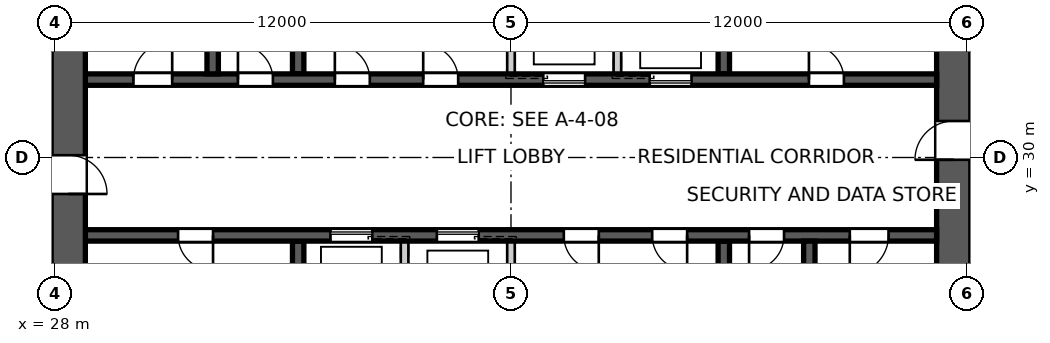
"""IFC4 building model, lengths in metres.
Left out: names, types, materials, properties, quantities, classifications, styles, units other than length and angle.
Written with IfcOpenShell. Run it as: python <this file> out.ifc"""

import sys

from ifc_helpers import new_model, si_unit, direction, frame, frame_2d, origin, place, context, subcontext, project, spatial, polyline, rectangle, outline, extrude, element, fill, save


model = new_model("IFC4")
c1 = context("Model", 3, precision=1e-05, world=origin(), true_north=direction((0.0, 1.0)))
c2 = subcontext(c1, "Body", "Model", "MODEL_VIEW")
j1 = project(units=[si_unit("LENGTHUNIT", "METRE"), si_unit("PLANEANGLEUNIT", "RADIAN")], contexts=[c1])
p1 = place(None, origin())
s1 = spatial("IfcSite", under=j1, at=p1, CompositionType="ELEMENT")
p2 = place(p1, origin())
s2 = spatial("IfcBuilding", under=s1, at=p2, CompositionType="ELEMENT")
p3 = place(p2, frame((0.0, 0.0, 240.4)))
s3 = spatial("IfcBuildingStorey", under=s2, at=p3, CompositionType="ELEMENT", Elevation=240.4)
p4 = place(p3, frame((51.65, 18.8, 0.0), z_axis=(0.0, 0.0, 1.0), x_axis=(0.0, 1.0, 0.0)))
e1 = element("IfcWall", 1, at=p4, inside=s3, PredefinedType="SHEAR", context=c2, shape_type="SweptSolid", body=[
    extrude(outline(polyline([(0.0, -0.45), (22.4, -0.45), (22.4, -0.025), (22.85, -0.025), (22.85, 0.025), (22.4, 0.025), (22.4, 0.45), (0.0, 0.45), (0.0, 0.025), (-0.45, 0.025), (-0.45, -0.025), (0.0, -0.025), (0.0, -0.45)])), origin(), (0.0, 0.0, 1.0), 3.4),
])
p5 = place(p4, frame((11.14, 0.0, 0.0)))
e2 = element("IfcOpeningElement", 2, at=p5, cuts=e1, PredefinedType="OPENING", context=c2, shape_type="SweptSolid", body=[
    extrude(rectangle(XDim=1.02, YDim=2.4, at=frame_2d((0.51, 1.2))), frame((0.0, 0.46, 0.0), z_axis=(0.0, -1.0, 0.0), x_axis=(1.0, 0.0, 0.0)), (0.0, 0.0, 1.0), 0.92),
])
p6 = place(p3, frame((28.35, 41.2, 0.0), z_axis=(0.0, 0.0, 1.0), x_axis=(0.0, -1.0, 0.0)))
e3 = element("IfcWall", 3, at=p6, inside=s3, PredefinedType="SHEAR", context=c2, shape_type="SweptSolid", body=[
    extrude(outline(polyline([(0.0, -0.45), (22.4, -0.45), (22.4, -0.025), (22.85, -0.025), (22.85, 0.025), (22.4, 0.025), (22.4, 0.45), (0.0, 0.45), (0.0, 0.025), (-0.45, 0.025), (-0.45, -0.025), (0.0, -0.025), (0.0, -0.45)])), origin(), (0.0, 0.0, 1.0), 3.4),
])
p7 = place(p6, frame((11.14, 0.0, 0.0)))
e4 = element("IfcOpeningElement", 4, at=p7, cuts=e3, PredefinedType="OPENING", context=c2, shape_type="SweptSolid", body=[
    extrude(rectangle(XDim=1.02, YDim=2.4, at=frame_2d((0.51, 1.2))), frame((0.0, 0.46, 0.0), z_axis=(0.0, -1.0, 0.0), x_axis=(1.0, 0.0, 0.0)), (0.0, 0.0, 1.0), 0.92),
])
p8 = place(p3, frame((28.8, 32.05, 0.0), z_axis=(0.0, 0.0, 1.0), x_axis=(1.0, 0.0, 0.0)))
e5 = element("IfcWall", 5, at=p8, inside=s3, PredefinedType="SHEAR", context=c2, shape_type="SweptSolid", body=[
    extrude(rectangle(XDim=22.4, YDim=0.3, at=frame_2d((11.2, 0.0))), origin(), (0.0, 0.0, 1.0), 3.4),
])
p9 = place(p8, frame((19.04, 0.0, 0.0)))
e6 = element("IfcOpeningElement", 6, at=p9, cuts=e5, PredefinedType="OPENING", context=c2, shape_type="SweptSolid", body=[
    extrude(rectangle(XDim=0.92, YDim=2.1, at=frame_2d((0.46, 1.05))), frame((0.0, 0.16, 0.0), z_axis=(0.0, -1.0, 0.0), x_axis=(1.0, 0.0, 0.0)), (0.0, 0.0, 1.0), 0.32),
])
p10 = place(p8, frame((1.265, 0.0, 0.0)))
e7 = element("IfcOpeningElement", 7, at=p10, cuts=e5, PredefinedType="OPENING", context=c2, shape_type="SweptSolid", body=[
    extrude(rectangle(XDim=1.02, YDim=2.1, at=frame_2d((0.51, 1.05))), frame((0.0, 0.16, 0.0), z_axis=(0.0, -1.0, 0.0), x_axis=(1.0, 0.0, 0.0)), (0.0, 0.0, 1.0), 0.32),
])
p11 = place(p8, frame((4.015, 0.0, 0.0)))
e8 = element("IfcOpeningElement", 8, at=p11, cuts=e5, PredefinedType="OPENING", context=c2, shape_type="SweptSolid", body=[
    extrude(rectangle(XDim=0.92, YDim=2.1, at=frame_2d((0.46, 1.05))), frame((0.0, 0.16, 0.0), z_axis=(0.0, -1.0, 0.0), x_axis=(1.0, 0.0, 0.0)), (0.0, 0.0, 1.0), 0.32),
])
p12 = place(p8, frame((6.565, 0.0, 0.0)))
e9 = element("IfcOpeningElement", 9, at=p12, cuts=e5, PredefinedType="OPENING", context=c2, shape_type="SweptSolid", body=[
    extrude(rectangle(XDim=0.92, YDim=2.1, at=frame_2d((0.46, 1.05))), frame((0.0, 0.16, 0.0), z_axis=(0.0, -1.0, 0.0), x_axis=(1.0, 0.0, 0.0)), (0.0, 0.0, 1.0), 0.32),
])
p13 = place(p8, frame((8.89, 0.0, 0.0)))
e10 = element("IfcOpeningElement", 10, at=p13, cuts=e5, PredefinedType="OPENING", context=c2, shape_type="SweptSolid", body=[
    extrude(rectangle(XDim=0.92, YDim=2.1, at=frame_2d((0.46, 1.05))), frame((0.0, 0.16, 0.0), z_axis=(0.0, -1.0, 0.0), x_axis=(1.0, 0.0, 0.0)), (0.0, 0.0, 1.0), 0.32),
])
p14 = place(p8, frame((12.05, 0.0, 0.0)))
e11 = element("IfcOpeningElement", 11, at=p14, cuts=e5, PredefinedType="OPENING", context=c2, shape_type="SweptSolid", body=[
    extrude(rectangle(XDim=1.1, YDim=2.1, at=frame_2d((0.55, 1.05))), frame((0.0, 0.16, 0.0), z_axis=(0.0, -1.0, 0.0), x_axis=(1.0, 0.0, 0.0)), (0.0, 0.0, 1.0), 0.32),
])
p15 = place(p8, frame((14.85, 0.0, 0.0)))
e12 = element("IfcOpeningElement", 12, at=p15, cuts=e5, PredefinedType="OPENING", context=c2, shape_type="SweptSolid", body=[
    extrude(rectangle(XDim=1.1, YDim=2.1, at=frame_2d((0.55, 1.05))), frame((0.0, 0.16, 0.0), z_axis=(0.0, -1.0, 0.0), x_axis=(1.0, 0.0, 0.0)), (0.0, 0.0, 1.0), 0.32),
])
p16 = place(p3, frame((51.2, 27.95, 0.0), z_axis=(0.0, 0.0, 1.0), x_axis=(-1.0, 0.0, 0.0)))
e13 = element("IfcWall", 13, at=p16, inside=s3, PredefinedType="SHEAR", context=c2, shape_type="SweptSolid", body=[
    extrude(rectangle(XDim=22.4, YDim=0.3, at=frame_2d((11.2, 0.0))), origin(), (0.0, 0.0, 1.0), 3.4),
])
p17 = place(p16, frame((19.04, 0.0, 0.0)))
e14 = element("IfcOpeningElement", 14, at=p17, cuts=e13, PredefinedType="OPENING", context=c2, shape_type="SweptSolid", body=[
    extrude(rectangle(XDim=0.92, YDim=2.1, at=frame_2d((0.46, 1.05))), frame((0.0, 0.16, 0.0), z_axis=(0.0, -1.0, 0.0), x_axis=(1.0, 0.0, 0.0)), (0.0, 0.0, 1.0), 0.32),
])
p18 = place(p16, frame((1.265, 0.0, 0.0)))
e15 = element("IfcOpeningElement", 15, at=p18, cuts=e13, PredefinedType="OPENING", context=c2, shape_type="SweptSolid", body=[
    extrude(rectangle(XDim=1.02, YDim=2.1, at=frame_2d((0.51, 1.05))), frame((0.0, 0.16, 0.0), z_axis=(0.0, -1.0, 0.0), x_axis=(1.0, 0.0, 0.0)), (0.0, 0.0, 1.0), 0.32),
])
p19 = place(p16, frame((4.015, 0.0, 0.0)))
e16 = element("IfcOpeningElement", 16, at=p19, cuts=e13, PredefinedType="OPENING", context=c2, shape_type="SweptSolid", body=[
    extrude(rectangle(XDim=0.92, YDim=2.1, at=frame_2d((0.46, 1.05))), frame((0.0, 0.16, 0.0), z_axis=(0.0, -1.0, 0.0), x_axis=(1.0, 0.0, 0.0)), (0.0, 0.0, 1.0), 0.32),
])
p20 = place(p16, frame((8.89, 0.0, 0.0)))
e17 = element("IfcOpeningElement", 17, at=p20, cuts=e13, PredefinedType="OPENING", context=c2, shape_type="SweptSolid", body=[
    extrude(rectangle(XDim=0.92, YDim=2.1, at=frame_2d((0.46, 1.05))), frame((0.0, 0.16, 0.0), z_axis=(0.0, -1.0, 0.0), x_axis=(1.0, 0.0, 0.0)), (0.0, 0.0, 1.0), 0.32),
])
p21 = place(p16, frame((6.565, 0.0, 0.0)))
e18 = element("IfcOpeningElement", 18, at=p21, cuts=e13, PredefinedType="OPENING", context=c2, shape_type="SweptSolid", body=[
    extrude(rectangle(XDim=0.92, YDim=2.1, at=frame_2d((0.46, 1.05))), frame((0.0, 0.16, 0.0), z_axis=(0.0, -1.0, 0.0), x_axis=(1.0, 0.0, 0.0)), (0.0, 0.0, 1.0), 0.32),
])
p22 = place(p16, frame((12.05, 0.0, 0.0)))
e19 = element("IfcOpeningElement", 19, at=p22, cuts=e13, PredefinedType="OPENING", context=c2, shape_type="SweptSolid", body=[
    extrude(rectangle(XDim=1.1, YDim=2.1, at=frame_2d((0.55, 1.05))), frame((0.0, 0.16, 0.0), z_axis=(0.0, -1.0, 0.0), x_axis=(1.0, 0.0, 0.0)), (0.0, 0.0, 1.0), 0.32),
])
p23 = place(p16, frame((14.85, 0.0, 0.0)))
e20 = element("IfcOpeningElement", 20, at=p23, cuts=e13, PredefinedType="OPENING", context=c2, shape_type="SweptSolid", body=[
    extrude(rectangle(XDim=1.1, YDim=2.1, at=frame_2d((0.55, 1.05))), frame((0.0, 0.16, 0.0), z_axis=(0.0, -1.0, 0.0), x_axis=(1.0, 0.0, 0.0)), (0.0, 0.0, 1.0), 0.32),
])
for number, where, z_axis, x_axis in (
    (21, (34.4, 32.2, 0.0), (0.0, 0.0, 1.0), (0.0, 1.0, 0.0)),
    (22, (45.6, 27.8, 0.0), (0.0, 0.0, 1.0), (0.0, -1.0, 0.0)),
):
    element("IfcWall", number, at=place(p3, frame(where, z_axis=z_axis, x_axis=x_axis)), inside=s3, PredefinedType="SHEAR", context=c2, shape_type="SweptSolid", body=[
        extrude(rectangle(XDim=2.8, YDim=0.3, at=frame_2d((1.4, 0.0))), origin(), (0.0, 0.0, 1.0), 3.4),
    ])
for number, where, z_axis, x_axis in (
    (23, (40.0, 32.2, 0.0), (0.0, 0.0, 1.0), (0.0, 1.0, 0.0)),
    (24, (40.0, 27.8, 0.0), (0.0, 0.0, 1.0), (0.0, -1.0, 0.0)),
    (25, (42.8, 32.2, 0.0), (0.0, 0.0, 1.0), (0.0, 1.0, 0.0)),
    (26, (37.2, 27.8, 0.0), (0.0, 0.0, 1.0), (0.0, -1.0, 0.0)),
):
    element("IfcWall", number, at=place(p3, frame(where, z_axis=z_axis, x_axis=x_axis)), inside=s3, PredefinedType="SOLIDWALL", context=c2, shape_type="SweptSolid", body=[
        extrude(rectangle(XDim=2.8, YDim=0.2, at=frame_2d((1.4, 0.0))), origin(), (0.0, 0.0, 1.0), 3.4),
    ])
for number, where, z_axis, x_axis in (
    (27, (45.6, 32.2, 0.0), (0.0, 0.0, 1.0), (0.0, 1.0, 0.0)),
    (28, (34.4, 27.8, 0.0), (0.0, 0.0, 1.0), (0.0, -1.0, 0.0)),
):
    element("IfcWall", number, at=place(p3, frame(where, z_axis=z_axis, x_axis=x_axis)), inside=s3, PredefinedType="SHEAR", context=c2, shape_type="SweptSolid", body=[
        extrude(rectangle(XDim=2.8, YDim=0.3, at=frame_2d((1.4, 0.0))), origin(), (0.0, 0.0, 1.0), 3.4),
    ])
for number, where, z_axis, x_axis in (
    (29, (32.15, 32.2, 0.0), (0.0, 0.0, 1.0), (0.0, 1.0, 0.0)),
    (30, (47.85, 27.8, 0.0), (0.0, 0.0, 1.0), (0.0, -1.0, 0.0)),
):
    element("IfcWall", number, at=place(p3, frame(where, z_axis=z_axis, x_axis=x_axis)), inside=s3, PredefinedType="SHEAR", context=c2, shape_type="SweptSolid", body=[
        extrude(rectangle(XDim=7.7, YDim=0.3, at=frame_2d((3.85, 0.0))), origin(), (0.0, 0.0, 1.0), 3.4),
    ])
p24 = place(p9, origin())
e31 = element("IfcDoor", 31, at=p24, inside=s3, OperationType="SINGLE_SWING_LEFT", PredefinedType="DOOR", context=c2, shape_type="SweptSolid", body=[
    extrude(rectangle(XDim=0.92, YDim=2.1, at=frame_2d((0.46, 1.05))), frame((0.0, 0.025, 0.0), z_axis=(0.0, -1.0, 0.0), x_axis=(1.0, 0.0, 0.0)), (0.0, 0.0, 1.0), 0.05),
])
fill(e6, e31)
p25 = place(p17, origin())
e32 = element("IfcDoor", 32, at=p25, inside=s3, OperationType="SINGLE_SWING_LEFT", PredefinedType="DOOR", context=c2, shape_type="SweptSolid", body=[
    extrude(rectangle(XDim=0.92, YDim=2.1, at=frame_2d((0.46, 1.05))), frame((0.0, 0.025, 0.0), z_axis=(0.0, -1.0, 0.0), x_axis=(1.0, 0.0, 0.0)), (0.0, 0.0, 1.0), 0.05),
])
fill(e14, e32)
p26 = place(p18, origin())
e33 = element("IfcDoor", 33, at=p26, inside=s3, OperationType="SINGLE_SWING_RIGHT", PredefinedType="DOOR", context=c2, shape_type="SweptSolid", body=[
    extrude(rectangle(XDim=1.02, YDim=2.1, at=frame_2d((0.51, 1.05))), frame((0.0, 0.025, 0.0), z_axis=(0.0, -1.0, 0.0), x_axis=(1.0, 0.0, 0.0)), (0.0, 0.0, 1.0), 0.05),
])
fill(e15, e33)
p27 = place(p10, origin())
e34 = element("IfcDoor", 34, at=p27, inside=s3, OperationType="SINGLE_SWING_RIGHT", PredefinedType="DOOR", context=c2, shape_type="SweptSolid", body=[
    extrude(rectangle(XDim=1.02, YDim=2.1, at=frame_2d((0.51, 1.05))), frame((0.0, 0.025, 0.0), z_axis=(0.0, -1.0, 0.0), x_axis=(1.0, 0.0, 0.0)), (0.0, 0.0, 1.0), 0.05),
])
fill(e7, e34)
p28 = place(p11, origin())
e35 = element("IfcDoor", 35, at=p28, inside=s3, OperationType="SINGLE_SWING_LEFT", PredefinedType="DOOR", context=c2, shape_type="SweptSolid", body=[
    extrude(rectangle(XDim=0.92, YDim=2.1, at=frame_2d((0.46, 1.05))), frame((0.0, 0.025, 0.0), z_axis=(0.0, -1.0, 0.0), x_axis=(1.0, 0.0, 0.0)), (0.0, 0.0, 1.0), 0.05),
])
fill(e8, e35)
p29 = place(p19, origin())
e36 = element("IfcDoor", 36, at=p29, inside=s3, OperationType="SINGLE_SWING_RIGHT", PredefinedType="DOOR", context=c2, shape_type="SweptSolid", body=[
    extrude(rectangle(XDim=0.92, YDim=2.1, at=frame_2d((0.46, 1.05))), frame((0.0, 0.025, 0.0), z_axis=(0.0, -1.0, 0.0), x_axis=(1.0, 0.0, 0.0)), (0.0, 0.0, 1.0), 0.05),
])
fill(e16, e36)
p30 = place(p12, origin())
e37 = element("IfcDoor", 37, at=p30, inside=s3, OperationType="SINGLE_SWING_LEFT", PredefinedType="DOOR", context=c2, shape_type="SweptSolid", body=[
    extrude(rectangle(XDim=0.92, YDim=2.1, at=frame_2d((0.46, 1.05))), frame((0.0, 0.025, 0.0), z_axis=(0.0, -1.0, 0.0), x_axis=(1.0, 0.0, 0.0)), (0.0, 0.0, 1.0), 0.05),
])
fill(e9, e37)
p31 = place(p13, origin())
e38 = element("IfcDoor", 38, at=p31, inside=s3, OperationType="SINGLE_SWING_LEFT", PredefinedType="DOOR", context=c2, shape_type="SweptSolid", body=[
    extrude(rectangle(XDim=0.92, YDim=2.1, at=frame_2d((0.46, 1.05))), frame((0.0, 0.025, 0.0), z_axis=(0.0, -1.0, 0.0), x_axis=(1.0, 0.0, 0.0)), (0.0, 0.0, 1.0), 0.05),
])
fill(e10, e38)
p32 = place(p20, origin())
e39 = element("IfcDoor", 39, at=p32, inside=s3, OperationType="SINGLE_SWING_LEFT", PredefinedType="DOOR", context=c2, shape_type="SweptSolid", body=[
    extrude(rectangle(XDim=0.92, YDim=2.1, at=frame_2d((0.46, 1.05))), frame((0.0, 0.025, 0.0), z_axis=(0.0, -1.0, 0.0), x_axis=(1.0, 0.0, 0.0)), (0.0, 0.0, 1.0), 0.05),
])
fill(e17, e39)
p33 = place(p21, origin())
e40 = element("IfcDoor", 40, at=p33, inside=s3, OperationType="SINGLE_SWING_LEFT", PredefinedType="DOOR", context=c2, shape_type="SweptSolid", body=[
    extrude(rectangle(XDim=0.92, YDim=2.1, at=frame_2d((0.46, 1.05))), frame((0.0, 0.025, 0.0), z_axis=(0.0, -1.0, 0.0), x_axis=(1.0, 0.0, 0.0)), (0.0, 0.0, 1.0), 0.05),
])
fill(e18, e40)
p34 = place(p5, origin())
e41 = element("IfcDoor", 41, at=p34, inside=s3, OperationType="SINGLE_SWING_LEFT", PredefinedType="DOOR", context=c2, shape_type="SweptSolid", body=[
    extrude(rectangle(XDim=1.02, YDim=2.4, at=frame_2d((0.51, 1.2))), frame((0.0, 0.025, 0.0), z_axis=(0.0, -1.0, 0.0), x_axis=(1.0, 0.0, 0.0)), (0.0, 0.0, 1.0), 0.05),
])
fill(e2, e41)
p35 = place(p7, origin())
e42 = element("IfcDoor", 42, at=p35, inside=s3, OperationType="SINGLE_SWING_RIGHT", PredefinedType="DOOR", context=c2, shape_type="SweptSolid", body=[
    extrude(rectangle(XDim=1.02, YDim=2.4, at=frame_2d((0.51, 1.2))), frame((0.0, 0.025, 0.0), z_axis=(0.0, -1.0, 0.0), x_axis=(1.0, 0.0, 0.0)), (0.0, 0.0, 1.0), 0.05),
])
fill(e4, e42)
p36 = place(p14, origin())
e43 = element("IfcDoor", 43, at=p36, inside=s3, OperationType="SLIDING_TO_LEFT", PredefinedType="DOOR", context=c2, shape_type="SweptSolid", body=[
    extrude(rectangle(XDim=1.1, YDim=2.1, at=frame_2d((0.55, 1.05))), frame((0.0, 0.025, 0.0), z_axis=(0.0, -1.0, 0.0), x_axis=(1.0, 0.0, 0.0)), (0.0, 0.0, 1.0), 0.05),
])
fill(e11, e43)
p37 = place(p22, origin())
e44 = element("IfcDoor", 44, at=p37, inside=s3, OperationType="SLIDING_TO_LEFT", PredefinedType="DOOR", context=c2, shape_type="SweptSolid", body=[
    extrude(rectangle(XDim=1.1, YDim=2.1, at=frame_2d((0.55, 1.05))), frame((0.0, 0.025, 0.0), z_axis=(0.0, -1.0, 0.0), x_axis=(1.0, 0.0, 0.0)), (0.0, 0.0, 1.0), 0.05),
])
fill(e19, e44)
p38 = place(p15, origin())
e45 = element("IfcDoor", 45, at=p38, inside=s3, OperationType="SLIDING_TO_LEFT", PredefinedType="DOOR", context=c2, shape_type="SweptSolid", body=[
    extrude(rectangle(XDim=1.1, YDim=2.1, at=frame_2d((0.55, 1.05))), frame((0.0, 0.025, 0.0), z_axis=(0.0, -1.0, 0.0), x_axis=(1.0, 0.0, 0.0)), (0.0, 0.0, 1.0), 0.05),
])
fill(e12, e45)
p39 = place(p23, origin())
e46 = element("IfcDoor", 46, at=p39, inside=s3, OperationType="SLIDING_TO_LEFT", PredefinedType="DOOR", context=c2, shape_type="SweptSolid", body=[
    extrude(rectangle(XDim=1.1, YDim=2.1, at=frame_2d((0.55, 1.05))), frame((0.0, 0.025, 0.0), z_axis=(0.0, -1.0, 0.0), x_axis=(1.0, 0.0, 0.0)), (0.0, 0.0, 1.0), 0.05),
])
fill(e20, e46)
save(model, sys.argv[1])
